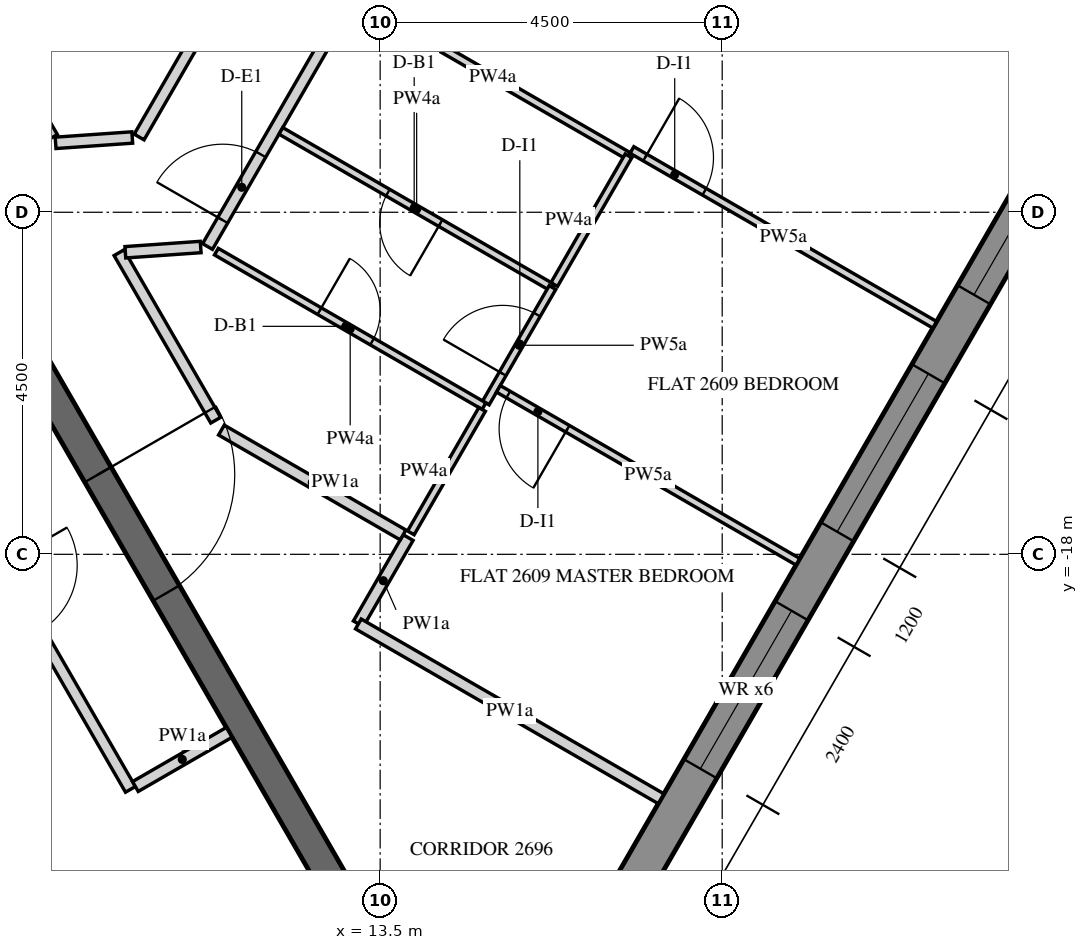
"""IFC4 building model, lengths in metres.
Left out: names, types, materials, properties, quantities, classifications, styles, units other than length and angle.
Written with IfcOpenShell. Run it as: python <this file> out.ifc"""

import sys

from ifc_helpers import new_model, si_unit, direction, frame, frame_2d, origin, place, context, subcontext, project, spatial, polyline, rectangle, outline, extrude, element, fill, save


model = new_model("IFC4")
c1 = context("Model", 3, precision=1e-05, world=origin(), true_north=direction((0.0, 1.0)))
c2 = subcontext(c1, "Body", "Model", "MODEL_VIEW")
j1 = project(units=[si_unit("LENGTHUNIT", "METRE"), si_unit("PLANEANGLEUNIT", "RADIAN")], contexts=[c1])
p1 = place(None, origin())
s1 = spatial("IfcSite", under=j1, at=p1, CompositionType="ELEMENT")
p2 = place(p1, origin())
s2 = spatial("IfcBuilding", under=s1, at=p2, CompositionType="ELEMENT")
p3 = place(p2, frame((0.0, 0.0, 334.2)))
s3 = spatial("IfcBuildingStorey", under=s2, at=p3, CompositionType="ELEMENT", Elevation=334.2)
p4 = place(p3, frame((16.451, -23.005, -0.15), z_axis=(0.0, 0.0, 1.0), x_axis=(0.500003737743, 0.866023245787, 0.0)))
e1 = element("IfcWall", 1, at=p4, inside=s3, PredefinedType="SOLIDWALL", context=c2, shape_type="SweptSolid", body=[
    extrude(outline(polyline([(-0.021, -0.25), (25.468, -0.25), (25.421, 0.25), (0.021, 0.25), (-0.021, -0.25)])), origin(), (0.0, 0.0, 1.0), 3.75),
])
p5 = place(p4, frame((2.522, 0.0, 0.75)))
e2 = element("IfcOpeningElement", 2, at=p5, cuts=e1, PredefinedType="OPENING", context=c2, shape_type="SweptSolid", body=[
    extrude(rectangle(XDim=2.4, YDim=2.7, at=frame_2d((1.2, 1.35))), frame((0.0, 0.26, 0.0), z_axis=(0.0, -1.0, 0.0), x_axis=(1.0, 0.0, 0.0)), (0.0, 0.0, 1.0), 0.52),
])
p6 = place(p4, frame((6.122, 0.0, 0.75)))
e3 = element("IfcOpeningElement", 3, at=p6, cuts=e1, PredefinedType="OPENING", context=c2, shape_type="SweptSolid", body=[
    extrude(rectangle(XDim=2.4, YDim=2.7, at=frame_2d((1.2, 1.35))), frame((0.0, 0.26, 0.0), z_axis=(0.0, -1.0, 0.0), x_axis=(1.0, 0.0, 0.0)), (0.0, 0.0, 1.0), 0.52),
])
p7 = place(p4, frame((9.722, 0.0, 0.75)))
e4 = element("IfcOpeningElement", 4, at=p7, cuts=e1, PredefinedType="OPENING", context=c2, shape_type="SweptSolid", body=[
    extrude(rectangle(XDim=2.4, YDim=2.7, at=frame_2d((1.2, 1.35))), frame((0.0, 0.26, 0.0), z_axis=(0.0, -1.0, 0.0), x_axis=(1.0, 0.0, 0.0)), (0.0, 0.0, 1.0), 0.52),
])
p8 = place(p4, frame((13.323, 0.0, 0.75)))
e5 = element("IfcOpeningElement", 5, at=p8, cuts=e1, PredefinedType="OPENING", context=c2, shape_type="SweptSolid", body=[
    extrude(rectangle(XDim=2.4, YDim=2.7, at=frame_2d((1.2, 1.35))), frame((0.0, 0.26, 0.0), z_axis=(0.0, -1.0, 0.0), x_axis=(1.0, 0.0, 0.0)), (0.0, 0.0, 1.0), 0.52),
])
p9 = place(p4, frame((16.922, 0.0, 0.75)))
e6 = element("IfcOpeningElement", 6, at=p9, cuts=e1, PredefinedType="OPENING", context=c2, shape_type="SweptSolid", body=[
    extrude(rectangle(XDim=2.4, YDim=2.7, at=frame_2d((1.2, 1.35))), frame((0.0, 0.26, 0.0), z_axis=(0.0, -1.0, 0.0), x_axis=(1.0, 0.0, 0.0)), (0.0, 0.0, 1.0), 0.52),
])
p10 = place(p4, frame((20.522, 0.0, 0.75)))
e7 = element("IfcOpeningElement", 7, at=p10, cuts=e1, PredefinedType="OPENING", context=c2, shape_type="SweptSolid", body=[
    extrude(rectangle(XDim=2.4, YDim=2.7, at=frame_2d((1.2, 1.35))), frame((0.0, 0.26, 0.0), z_axis=(0.0, -1.0, 0.0), x_axis=(1.0, 0.0, 0.0)), (0.0, 0.0, 1.0), 0.52),
])
p11 = place(p3, frame((6.351, -11.0, -0.15), z_axis=(0.0, 0.0, 1.0), x_axis=(0.499998894578, -0.866026041999, 0.0)))
e8 = element("IfcWall", 8, at=p11, inside=s3, PredefinedType="SHEAR", context=c2, shape_type="SweptSolid", body=[
    extrude(rectangle(XDim=15.544, YDim=0.4, at=frame_2d((7.772, 0.0))), origin(), (0.0, 0.0, 1.0), 3.75),
])
p12 = place(p11, frame((6.872, 0.0, 0.15)))
e9 = element("IfcOpeningElement", 9, at=p12, cuts=e8, PredefinedType="OPENING", context=c2, shape_type="SweptSolid", body=[
    extrude(rectangle(XDim=1.8, YDim=2.4, at=frame_2d((0.9, 1.2))), frame((0.0, 0.21, 0.0), z_axis=(0.0, -1.0, 0.0), x_axis=(1.0, 0.0, 0.0)), (0.0, 0.0, 1.0), 0.42),
])
p13 = place(p3, frame((6.333, -14.368, 0.0), z_axis=(0.0, 0.0, 1.0), x_axis=(0.499977396983, -0.866038453249, 0.0)))
e10 = element("IfcWall", 10, at=p13, inside=s3, PredefinedType="PARTITIONING", context=c2, shape_type="SweptSolid", body=[
    extrude(rectangle(XDim=7.764, YDim=0.15, at=frame_2d((3.882, 0.0))), origin(), (0.0, 0.0, 1.0), 2.838),
])
p14 = place(p13, frame((4.364, 0.0, 0.0)))
e11 = element("IfcOpeningElement", 11, at=p14, cuts=e10, PredefinedType="OPENING", context=c2, shape_type="SweptSolid", body=[
    extrude(rectangle(XDim=1.0, YDim=2.1, at=frame_2d((0.5, 1.05))), frame((0.0, 0.085, 0.0), z_axis=(0.0, -1.0, 0.0), x_axis=(1.0, 0.0, 0.0)), (0.0, 0.0, 1.0), 0.17),
])
p15 = place(p3, frame((10.28, -21.055, 0.0), z_axis=(0.0, 0.0, 1.0), x_axis=(0.866020080793, 0.500009219579, 0.0)))
e12 = element("IfcWall", 12, at=p15, inside=s3, PredefinedType="PARTITIONING", context=c2, shape_type="SweptSolid", body=[
    extrude(rectangle(XDim=1.425, YDim=0.15, at=frame_2d((0.712, 0.0))), origin(), (0.0, 0.0, 1.0), 2.838),
])
p16 = place(p3, frame((11.229, -13.951, 0.0), z_axis=(0.0, 0.0, 1.0), x_axis=(0.499997948852, 0.866026588012, 0.0)))
e13 = element("IfcWall", 13, at=p16, inside=s3, PredefinedType="PARTITIONING", context=c2, shape_type="SweptSolid", body=[
    extrude(rectangle(XDim=14.677, YDim=0.15, at=frame_2d((7.339, 0.0))), origin(), (0.0, 0.0, 1.0), 2.838),
])
p17 = place(p16, frame((0.4, 0.0, 0.0)))
e14 = element("IfcOpeningElement", 14, at=p17, cuts=e13, PredefinedType="OPENING", context=c2, shape_type="SweptSolid", body=[
    extrude(rectangle(XDim=1.0, YDim=2.1, at=frame_2d((0.5, 1.05))), frame((0.0, 0.085, 0.0), z_axis=(0.0, -1.0, 0.0), x_axis=(1.0, 0.0, 0.0)), (0.0, 0.0, 1.0), 0.17),
])
p18 = place(p16, frame((13.527, 0.0, 0.0)))
e15 = element("IfcOpeningElement", 15, at=p18, cuts=e13, PredefinedType="OPENING", context=c2, shape_type="SweptSolid", body=[
    extrude(rectangle(XDim=1.0, YDim=2.1, at=frame_2d((0.5, 1.05))), frame((0.0, 0.085, 0.0), z_axis=(0.0, -1.0, 0.0), x_axis=(1.0, 0.0, 0.0)), (0.0, 0.0, 1.0), 0.17),
])
p19 = place(p3, frame((13.213, -18.915, 0.0), z_axis=(0.0, 0.0, 1.0), x_axis=(0.499985832843, 0.866033583042, 0.0)))
e16 = element("IfcWall", 16, at=p19, inside=s3, PredefinedType="PARTITIONING", context=c2, shape_type="SweptSolid", body=[
    extrude(rectangle(XDim=1.311, YDim=0.15, at=frame_2d((0.655, 0.0))), origin(), (0.0, 0.0, 1.0), 2.838),
])
p20 = place(p3, frame((17.196, -21.216, 0.0), z_axis=(0.0, 0.0, 1.0), x_axis=(-0.866032643562, 0.499987460128, 0.0)))
e17 = element("IfcWall", 17, at=p20, inside=s3, PredefinedType="PARTITIONING", context=c2, shape_type="SweptSolid", body=[
    extrude(rectangle(XDim=4.599, YDim=0.15, at=frame_2d((2.299, 0.0))), origin(), (0.0, 0.0, 1.0), 2.838),
])
p21 = place(p3, frame((13.802, -17.745, 0.0), z_axis=(0.0, 0.0, 1.0), x_axis=(-0.866051521422, 0.499954760196, 0.0)))
e18 = element("IfcWall", 18, at=p21, inside=s3, PredefinedType="PARTITIONING", context=c2, shape_type="SweptSolid", body=[
    extrude(rectangle(XDim=2.76, YDim=0.15, at=frame_2d((1.38, 0.0))), origin(), (0.0, 0.0, 1.0), 2.838),
])
p22 = place(p3, frame((11.337, -16.236, 0.0), z_axis=(0.0, 0.0, 1.0), x_axis=(-0.500029781311, 0.866008208854, 0.0)))
e19 = element("IfcWall", 19, at=p22, inside=s3, PredefinedType="PARTITIONING", context=c2, shape_type="SweptSolid", body=[
    extrude(rectangle(XDim=2.544, YDim=0.15, at=frame_2d((1.272, 0.0))), origin(), (0.0, 0.0, 1.0), 2.838),
])
p23 = place(p3, frame((10.148, -14.026, 0.0), z_axis=(0.0, 0.0, 1.0), x_axis=(0.99756238904, 0.069780226228, 0.0)))
e20 = element("IfcWall", 20, at=p23, inside=s3, PredefinedType="PARTITIONING", context=c2, shape_type="SweptSolid", body=[
    extrude(rectangle(XDim=0.994, YDim=0.15, at=frame_2d((0.497, 0.0))), origin(), (0.0, 0.0, 1.0), 2.838),
])
p24 = place(p3, frame((12.615, -8.549, 0.0), z_axis=(0.0, 0.0, 1.0), x_axis=(-0.499985850067, -0.866033573098, 0.0)))
e21 = element("IfcWall", 21, at=p24, inside=s3, PredefinedType="PARTITIONING", context=c2, shape_type="SweptSolid", body=[
    extrude(rectangle(XDim=4.573, YDim=0.15, at=frame_2d((2.287, 0.0))), origin(), (0.0, 0.0, 1.0), 2.838),
])
p25 = place(p24, frame((1.837, 0.0, 0.0)))
e22 = element("IfcOpeningElement", 22, at=p25, cuts=e21, PredefinedType="OPENING", context=c2, shape_type="SweptSolid", body=[
    extrude(rectangle(XDim=0.9, YDim=2.1, at=frame_2d((0.45, 1.05))), frame((0.0, 0.085, 0.0), z_axis=(0.0, -1.0, 0.0), x_axis=(1.0, 0.0, 0.0)), (0.0, 0.0, 1.0), 0.17),
])
p26 = place(p3, frame((10.239, -12.516, 0.0), z_axis=(0.0, 0.0, 1.0), x_axis=(-0.997561825928, -0.069788275888, 0.0)))
e23 = element("IfcWall", 23, at=p26, inside=s3, PredefinedType="PARTITIONING", context=c2, shape_type="SweptSolid", body=[
    extrude(rectangle(XDim=1.011, YDim=0.15, at=frame_2d((0.505, 0.0))), origin(), (0.0, 0.0, 1.0), 2.838),
])
p27 = place(p3, frame((9.188, -12.515, 0.0), z_axis=(0.0, 0.0, 1.0), x_axis=(-0.499998034377, 0.866026538634, 0.0)))
e24 = element("IfcWall", 24, at=p27, inside=s3, PredefinedType="PARTITIONING", context=c2, shape_type="SweptSolid", body=[
    extrude(rectangle(XDim=0.946, YDim=0.15, at=frame_2d((0.473, 0.0))), origin(), (0.0, 0.0, 1.0), 2.838),
])
p28 = place(p3, frame((13.194, -10.697, 0.0), z_axis=(0.0, 0.0, 1.0), x_axis=(0.866019999656, -0.500009360108, 0.0)))
e25 = element("IfcWall", 25, at=p28, inside=s3, PredefinedType="PARTITIONING", context=c2, shape_type="SweptSolid", body=[
    extrude(rectangle(XDim=4.125, YDim=0.1, at=frame_2d((2.062, 0.0))), origin(), (0.0, 0.0, 1.0), 2.838),
])
p29 = place(p3, frame((16.812, -12.68, 0.0), z_axis=(0.0, 0.0, 1.0), x_axis=(0.866030038822, -0.499991971794, 0.0)))
e26 = element("IfcWall", 26, at=p29, inside=s3, PredefinedType="PARTITIONING", context=c2, shape_type="SweptSolid", body=[
    extrude(rectangle(XDim=4.6, YDim=0.1, at=frame_2d((2.3, 0.0))), origin(), (0.0, 0.0, 1.0), 2.838),
])
p30 = place(p29, frame((0.2, 0.0, 0.0)))
e27 = element("IfcOpeningElement", 27, at=p30, cuts=e26, PredefinedType="OPENING", context=c2, shape_type="SweptSolid", body=[
    extrude(rectangle(XDim=0.9, YDim=2.1, at=frame_2d((0.45, 1.05))), frame((0.0, 0.06, 0.0), z_axis=(0.0, -1.0, 0.0), x_axis=(1.0, 0.0, 0.0)), (0.0, 0.0, 1.0), 0.12),
])
p31 = place(p3, frame((15.766, -14.492, 0.0), z_axis=(0.0, 0.0, 1.0), x_axis=(-0.866019999656, 0.500009360108, 0.0)))
e28 = element("IfcWall", 28, at=p31, inside=s3, PredefinedType="PARTITIONING", context=c2, shape_type="SweptSolid", body=[
    extrude(rectangle(XDim=4.125, YDim=0.1, at=frame_2d((2.062, 0.0))), origin(), (0.0, 0.0, 1.0), 2.838),
])
p32 = place(p31, frame((1.7, 0.0, 0.0)))
e29 = element("IfcOpeningElement", 29, at=p32, cuts=e28, PredefinedType="OPENING", context=c2, shape_type="SweptSolid", body=[
    extrude(rectangle(XDim=0.8, YDim=2.1, at=frame_2d((0.4, 1.05))), frame((0.0, 0.06, 0.0), z_axis=(0.0, -1.0, 0.0), x_axis=(1.0, 0.0, 0.0)), (0.0, 0.0, 1.0), 0.12),
])
p33 = place(p3, frame((14.89, -16.009, 0.0), z_axis=(0.0, 0.0, 1.0), x_axis=(0.499971461383, 0.866041879935, 0.0)))
e30 = element("IfcWall", 30, at=p33, inside=s3, PredefinedType="PARTITIONING", context=c2, shape_type="SweptSolid", body=[
    extrude(rectangle(XDim=1.754, YDim=0.1, at=frame_2d((0.877, 0.0))), origin(), (0.0, 0.0, 1.0), 2.838),
])
p34 = place(p33, frame((0.444, 0.0, 0.0)))
e31 = element("IfcOpeningElement", 31, at=p34, cuts=e30, PredefinedType="OPENING", context=c2, shape_type="SweptSolid", body=[
    extrude(rectangle(XDim=0.9, YDim=2.1, at=frame_2d((0.45, 1.05))), frame((0.0, 0.06, 0.0), z_axis=(0.0, -1.0, 0.0), x_axis=(1.0, 0.0, 0.0)), (0.0, 0.0, 1.0), 0.12),
])
p35 = place(p3, frame((11.345, -14.018, 0.0), z_axis=(0.0, 0.0, 1.0), x_axis=(0.866028600041, -0.49999446388, 0.0)))
e32 = element("IfcWall", 32, at=p35, inside=s3, PredefinedType="PARTITIONING", context=c2, shape_type="SweptSolid", body=[
    extrude(rectangle(XDim=4.066, YDim=0.1, at=frame_2d((2.033, 0.0))), origin(), (0.0, 0.0, 1.0), 2.838),
])
p36 = place(p35, frame((1.566, 0.0, 0.0)))
e33 = element("IfcOpeningElement", 33, at=p36, cuts=e32, PredefinedType="OPENING", context=c2, shape_type="SweptSolid", body=[
    extrude(rectangle(XDim=0.8, YDim=2.1, at=frame_2d((0.4, 1.05))), frame((0.0, 0.06, 0.0), z_axis=(0.0, -1.0, 0.0), x_axis=(1.0, 0.0, 0.0)), (0.0, 0.0, 1.0), 0.12),
])
p37 = place(p3, frame((15.79, -14.45, 0.0), z_axis=(0.0, 0.0, 1.0), x_axis=(0.500036104519, 0.866004557827, 0.0)))
e34 = element("IfcWall", 34, at=p37, inside=s3, PredefinedType="PARTITIONING", context=c2, shape_type="SweptSolid", body=[
    extrude(rectangle(XDim=1.954, YDim=0.1, at=frame_2d((0.977, 0.0))), origin(), (0.0, 0.0, 1.0), 2.838),
])
p38 = place(p3, frame((18.996, -18.098, 0.0), z_axis=(0.0, 0.0, 1.0), x_axis=(-0.866035472144, 0.499982560684, 0.0)))
e35 = element("IfcWall", 35, at=p38, inside=s3, PredefinedType="PARTITIONING", context=c2, shape_type="SweptSolid", body=[
    extrude(rectangle(XDim=4.55, YDim=0.1, at=frame_2d((2.275, 0.0))), origin(), (0.0, 0.0, 1.0), 2.838),
])
p39 = place(p38, frame((3.5, 0.0, 0.0)))
e36 = element("IfcOpeningElement", 36, at=p39, cuts=e35, PredefinedType="OPENING", context=c2, shape_type="SweptSolid", body=[
    extrude(rectangle(XDim=0.9, YDim=2.1, at=frame_2d((0.45, 1.05))), frame((0.0, 0.06, 0.0), z_axis=(0.0, -1.0, 0.0), x_axis=(1.0, 0.0, 0.0)), (0.0, 0.0, 1.0), 0.12),
])
p40 = place(p3, frame((14.841, -16.094, 0.0), z_axis=(0.0, 0.0, 1.0), x_axis=(-0.500004234368, -0.866022959057, 0.0)))
e37 = element("IfcWall", 37, at=p40, inside=s3, PredefinedType="PARTITIONING", context=c2, shape_type="SweptSolid", body=[
    extrude(rectangle(XDim=1.875, YDim=0.1, at=frame_2d((0.938, 0.0))), origin(), (0.0, 0.0, 1.0), 2.838),
])
p41 = place(p5, frame((0.0, 0.18, 0.0)))
e38 = element("IfcWindow", 38, at=p41, inside=s3, PartitioningType="DOUBLE_PANEL_VERTICAL", PredefinedType="WINDOW", context=c2, shape_type="SweptSolid", body=[
    extrude(rectangle(XDim=2.4, YDim=2.7, at=frame_2d((1.2, 1.35))), frame((0.0, 0.03, 0.0), z_axis=(0.0, -1.0, 0.0), x_axis=(1.0, 0.0, 0.0)), (0.0, 0.0, 1.0), 0.06),
])
fill(e2, e38)
p42 = place(p6, frame((0.0, 0.18, 0.0)))
e39 = element("IfcWindow", 39, at=p42, inside=s3, PartitioningType="DOUBLE_PANEL_VERTICAL", PredefinedType="WINDOW", context=c2, shape_type="SweptSolid", body=[
    extrude(rectangle(XDim=2.4, YDim=2.7, at=frame_2d((1.2, 1.35))), frame((0.0, 0.03, 0.0), z_axis=(0.0, -1.0, 0.0), x_axis=(1.0, 0.0, 0.0)), (0.0, 0.0, 1.0), 0.06),
])
fill(e3, e39)
p43 = place(p7, frame((0.0, 0.18, 0.0)))
e40 = element("IfcWindow", 40, at=p43, inside=s3, PartitioningType="DOUBLE_PANEL_VERTICAL", PredefinedType="WINDOW", context=c2, shape_type="SweptSolid", body=[
    extrude(rectangle(XDim=2.4, YDim=2.7, at=frame_2d((1.2, 1.35))), frame((0.0, 0.03, 0.0), z_axis=(0.0, -1.0, 0.0), x_axis=(1.0, 0.0, 0.0)), (0.0, 0.0, 1.0), 0.06),
])
fill(e4, e40)
p44 = place(p12, origin())
e41 = element("IfcDoor", 41, at=p44, inside=s3, OperationType="DOUBLE_DOOR_SINGLE_SWING", PredefinedType="DOOR", context=c2, shape_type="SweptSolid", body=[
    extrude(rectangle(XDim=1.8, YDim=2.4, at=frame_2d((0.9, 1.2))), frame((0.0, 0.025, 0.0), z_axis=(0.0, -1.0, 0.0), x_axis=(1.0, 0.0, 0.0)), (0.0, 0.0, 1.0), 0.05),
])
fill(e9, e41)
p45 = place(p17, origin())
e42 = element("IfcDoor", 42, at=p45, inside=s3, OperationType="SINGLE_SWING_RIGHT", PredefinedType="DOOR", context=c2, shape_type="SweptSolid", body=[
    extrude(rectangle(XDim=1.0, YDim=2.1, at=frame_2d((0.5, 1.05))), frame((0.0, 0.025, 0.0), z_axis=(0.0, -1.0, 0.0), x_axis=(1.0, 0.0, 0.0)), (0.0, 0.0, 1.0), 0.05),
])
fill(e14, e42)
p46 = place(p32, origin())
e43 = element("IfcDoor", 43, at=p46, inside=s3, OperationType="SINGLE_SWING_LEFT", PredefinedType="DOOR", context=c2, shape_type="SweptSolid", body=[
    extrude(rectangle(XDim=0.8, YDim=2.1, at=frame_2d((0.4, 1.05))), frame((0.0, 0.025, 0.0), z_axis=(0.0, -1.0, 0.0), x_axis=(1.0, 0.0, 0.0)), (0.0, 0.0, 1.0), 0.05),
])
fill(e29, e43)
p47 = place(p34, origin())
e44 = element("IfcDoor", 44, at=p47, inside=s3, OperationType="SINGLE_SWING_RIGHT", PredefinedType="DOOR", context=c2, shape_type="SweptSolid", body=[
    extrude(rectangle(XDim=0.9, YDim=2.1, at=frame_2d((0.45, 1.05))), frame((0.0, 0.025, 0.0), z_axis=(0.0, -1.0, 0.0), x_axis=(1.0, 0.0, 0.0)), (0.0, 0.0, 1.0), 0.05),
])
fill(e31, e44)
p48 = place(p39, origin())
e45 = element("IfcDoor", 45, at=p48, inside=s3, OperationType="SINGLE_SWING_RIGHT", PredefinedType="DOOR", context=c2, shape_type="SweptSolid", body=[
    extrude(rectangle(XDim=0.9, YDim=2.1, at=frame_2d((0.45, 1.05))), frame((0.0, 0.025, 0.0), z_axis=(0.0, -1.0, 0.0), x_axis=(1.0, 0.0, 0.0)), (0.0, 0.0, 1.0), 0.05),
])
fill(e36, e45)
p49 = place(p30, origin())
e46 = element("IfcDoor", 46, at=p49, inside=s3, OperationType="SINGLE_SWING_RIGHT", PredefinedType="DOOR", context=c2, shape_type="SweptSolid", body=[
    extrude(rectangle(XDim=0.9, YDim=2.1, at=frame_2d((0.45, 1.05))), frame((0.0, 0.025, 0.0), z_axis=(0.0, -1.0, 0.0), x_axis=(1.0, 0.0, 0.0)), (0.0, 0.0, 1.0), 0.05),
])
fill(e27, e46)
p50 = place(p36, origin())
e47 = element("IfcDoor", 47, at=p50, inside=s3, OperationType="SINGLE_SWING_RIGHT", PredefinedType="DOOR", context=c2, shape_type="SweptSolid", body=[
    extrude(rectangle(XDim=0.8, YDim=2.1, at=frame_2d((0.4, 1.05))), frame((0.0, 0.025, 0.0), z_axis=(0.0, -1.0, 0.0), x_axis=(1.0, 0.0, 0.0)), (0.0, 0.0, 1.0), 0.05),
])
fill(e33, e47)
save(model, sys.argv[1])
